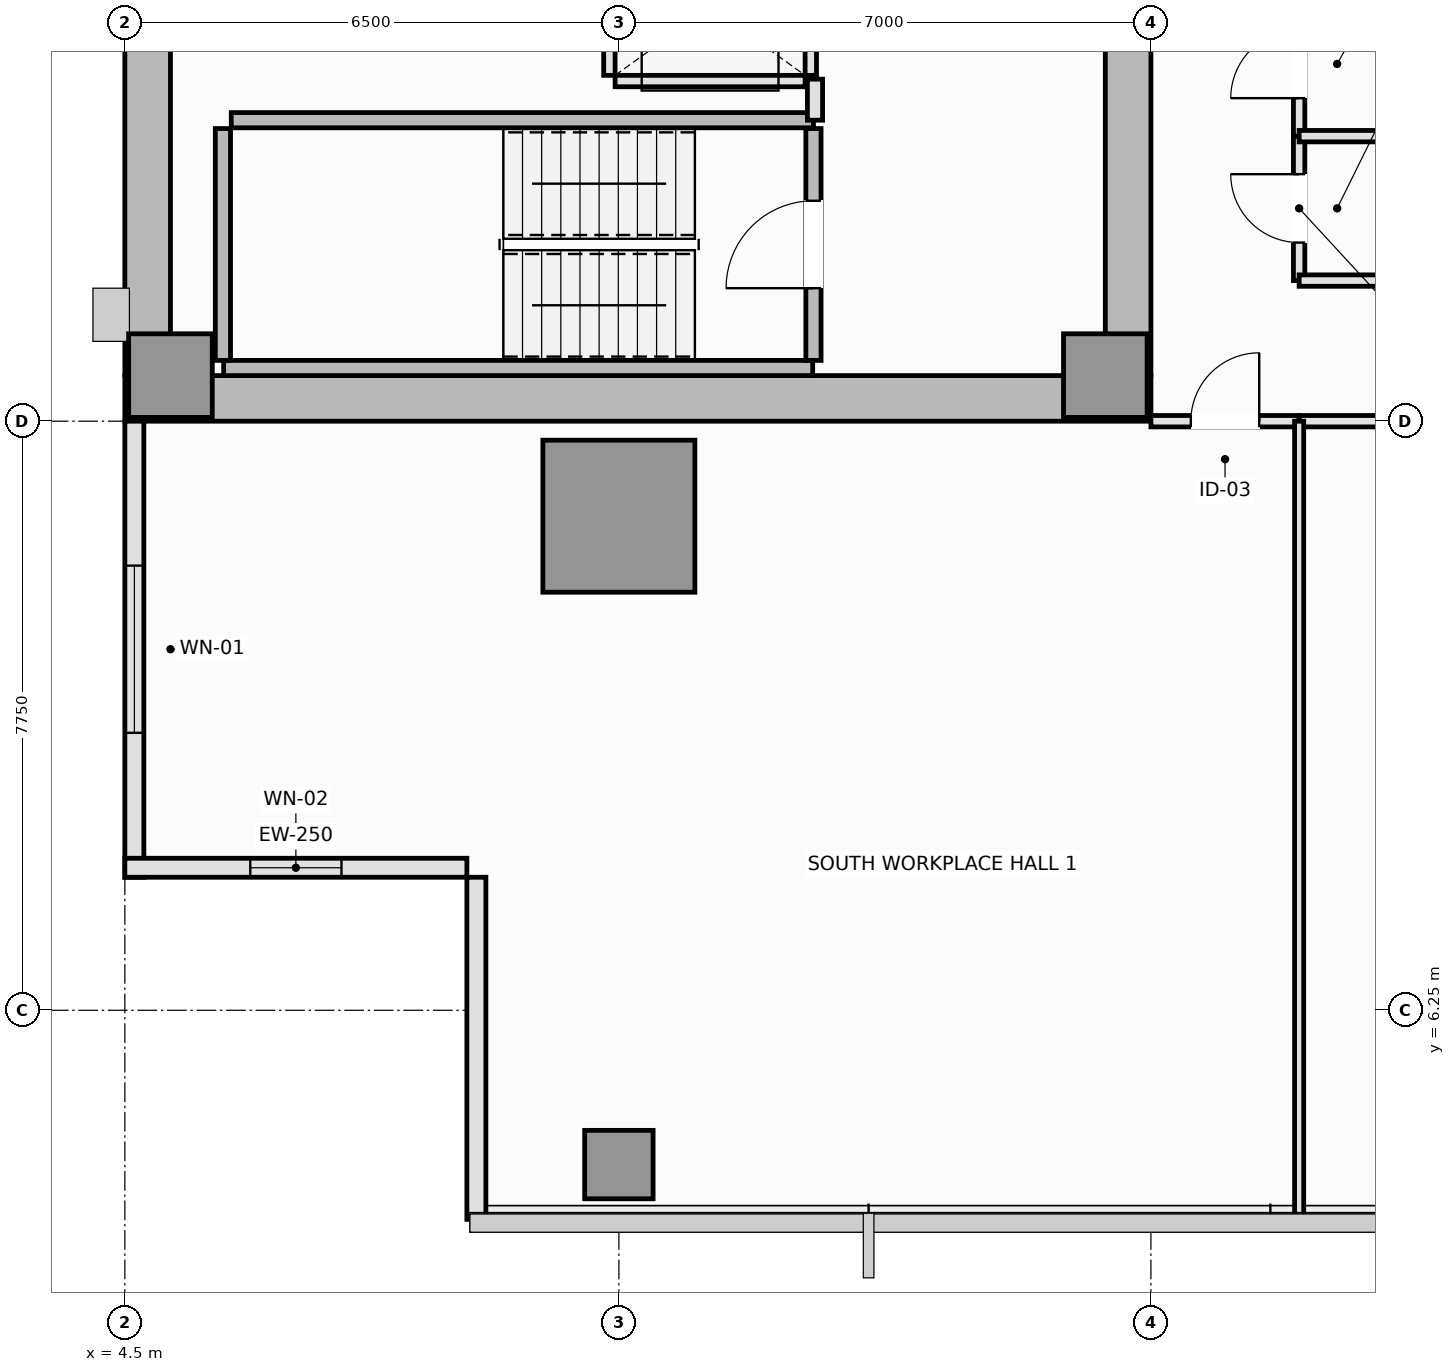
"""IFC4 building model, lengths in metres.
Left out: names, types, materials, properties, quantities, classifications, styles, units other than length and angle.
Written with IfcOpenShell. Run it as: python <this file> out.ifc"""

import sys

from ifc_helpers import new_model, si_unit, direction, frame, frame_2d, origin, origin_2d, place, context, subcontext, project, spatial, rectangle, extrude, element, fill, save


model = new_model("IFC4")
c1 = context("Model", 3, precision=1e-05, world=origin(), true_north=direction((0.0, 1.0)))
c2 = subcontext(c1, "Body", "Model", "MODEL_VIEW")
j1 = project(units=[si_unit("LENGTHUNIT", "METRE"), si_unit("PLANEANGLEUNIT", "RADIAN")], contexts=[c1])
p1 = place(None, origin())
s1 = spatial("IfcSite", under=j1, at=p1, CompositionType="ELEMENT")
p2 = place(p1, origin())
s2 = spatial("IfcBuilding", under=s1, at=p2, CompositionType="ELEMENT")
p3 = place(p2, frame((0.0, 0.0, 127.1)))
s3 = spatial("IfcBuildingStorey", under=s2, at=p3, CompositionType="ELEMENT", Elevation=127.1)
p4 = place(p3, frame((4.5, 14.3, 0.0), z_axis=(0.0, 0.0, 1.0), x_axis=(1.0, 0.0, 0.0)))
e1 = element("IfcWall", 1, at=p4, inside=s3, PredefinedType="SHEAR", context=c2, shape_type="SweptSolid", body=[
    extrude(rectangle(XDim=13.5, YDim=0.6, at=frame_2d((6.75, 0.0))), origin(), (0.0, 0.0, 1.0), 3.55),
])
p5 = place(p3, frame((4.8, 14.6, 0.0), z_axis=(0.0, 0.0, 1.0), x_axis=(0.0, 1.0, 0.0)))
e2 = element("IfcWall", 2, at=p5, inside=s3, PredefinedType="SHEAR", context=c2, shape_type="SweptSolid", body=[
    extrude(rectangle(XDim=21.3, YDim=0.6, at=frame_2d((10.65, 0.0))), origin(), (0.0, 0.0, 1.0), 3.55),
])
p6 = place(p3, frame((17.7, 14.6, 0.0), z_axis=(0.0, 0.0, 1.0), x_axis=(0.0, 1.0, 0.0)))
e3 = element("IfcWall", 3, at=p6, inside=s3, PredefinedType="SHEAR", context=c2, shape_type="SweptSolid", body=[
    extrude(rectangle(XDim=8.85, YDim=0.6, at=frame_2d((4.425, 0.0))), origin(), (0.0, 0.0, 1.0), 3.55),
])
p7 = place(p6, frame((4.3, 0.0, 0.0)))
e4 = element("IfcOpeningElement", 4, at=p7, cuts=e3, PredefinedType="OPENING", context=c2, shape_type="SweptSolid", body=[
    extrude(rectangle(XDim=1.1, YDim=2.15, at=frame_2d((0.55, 1.075))), frame((0.0, 0.31, 0.0), z_axis=(0.0, -1.0, 0.0), x_axis=(1.0, 0.0, 0.0)), (0.0, 0.0, 1.0), 0.62),
])
for number, where, z_axis, x_axis in (
    (5, (5.1, 14.6, 0.0), (0.0, 0.0, 1.0), (1.0, 0.0, 0.0)),
    (6, (17.4, 14.6, 0.0), (0.0, 0.0, 1.0), (1.0, 0.0, 0.0)),
):
    element("IfcColumn", number, at=place(p3, frame(where, z_axis=z_axis, x_axis=x_axis)), inside=s3, PredefinedType="PILASTER", context=c2, shape_type="SweptSolid", body=[
        extrude(rectangle(XDim=1.1, YDim=1.1, at=origin_2d()), origin(), (0.0, 0.0, 1.0), 3.55),
    ])
p8 = place(p3, frame((11.0, 12.75, 0.0), z_axis=(0.0, 0.0, 1.0), x_axis=(1.0, 0.0, 0.0)))
e7 = element("IfcColumn", 7, at=p8, inside=s3, PredefinedType="COLUMN", context=c2, shape_type="SweptSolid", body=[
    extrude(rectangle(XDim=2.0, YDim=2.0, at=origin_2d()), origin(), (0.0, 0.0, 1.0), 3.55),
])
p9 = place(p3, frame((11.0, 4.22, 0.0), z_axis=(0.0, 0.0, 1.0), x_axis=(1.0, 0.0, 0.0)))
e8 = element("IfcColumn", 8, at=p9, inside=s3, PredefinedType="COLUMN", context=c2, shape_type="SweptSolid", body=[
    extrude(rectangle(XDim=0.9, YDim=0.9, at=origin_2d()), origin(), (0.0, 0.0, 1.0), 3.55),
])
p10 = place(p3, frame((4.625, 14.0, 0.0), z_axis=(0.0, 0.0, 1.0), x_axis=(0.0, -1.0, 0.0)))
e9 = element("IfcWall", 9, at=p10, inside=s3, PredefinedType="SOLIDWALL", context=c2, shape_type="SweptSolid", body=[
    extrude(rectangle(XDim=6.0, YDim=0.25, at=frame_2d((3.0, 0.0))), origin(), (0.0, 0.0, 1.0), 3.37),
])
p11 = place(p10, frame((1.9, 0.0, 0.9)))
e10 = element("IfcOpeningElement", 10, at=p11, cuts=e9, PredefinedType="OPENING", context=c2, shape_type="SweptSolid", body=[
    extrude(rectangle(XDim=2.2, YDim=1.8, at=frame_2d((1.1, 0.9))), frame((0.0, 0.135, 0.0), z_axis=(0.0, -1.0, 0.0), x_axis=(1.0, 0.0, 0.0)), (0.0, 0.0, 1.0), 0.27),
])
p12 = place(p3, frame((4.5, 8.125, 0.0), z_axis=(0.0, 0.0, 1.0), x_axis=(1.0, 0.0, 0.0)))
e11 = element("IfcWall", 11, at=p12, inside=s3, PredefinedType="SOLIDWALL", context=c2, shape_type="SweptSolid", body=[
    extrude(rectangle(XDim=4.5, YDim=0.25, at=frame_2d((2.25, 0.0))), origin(), (0.0, 0.0, 1.0), 3.37),
])
p13 = place(p12, frame((1.65, 0.0, 0.9)))
e12 = element("IfcOpeningElement", 12, at=p13, cuts=e11, PredefinedType="OPENING", context=c2, shape_type="SweptSolid", body=[
    extrude(rectangle(XDim=1.2, YDim=1.8, at=frame_2d((0.6, 0.9))), frame((0.0, 0.135, 0.0), z_axis=(0.0, -1.0, 0.0), x_axis=(1.0, 0.0, 0.0)), (0.0, 0.0, 1.0), 0.27),
])
p14 = place(p3, frame((9.125, 8.0, 0.0), z_axis=(0.0, 0.0, 1.0), x_axis=(0.0, -1.0, 0.0)))
e13 = element("IfcWall", 13, at=p14, inside=s3, PredefinedType="SOLIDWALL", context=c2, shape_type="SweptSolid", body=[
    extrude(rectangle(XDim=4.5, YDim=0.25, at=frame_2d((2.25, 0.0))), origin(), (0.0, 0.0, 1.0), 3.37),
])
p15 = place(p3, frame((5.8, 14.7, 0.0), z_axis=(0.0, 0.0, 1.0), x_axis=(1.0, 0.0, 0.0)))
e14 = element("IfcWall", 14, at=p15, inside=s3, PredefinedType="SOLIDWALL", context=c2, shape_type="SweptSolid", body=[
    extrude(rectangle(XDim=7.75, YDim=0.2, at=frame_2d((3.875, 0.0))), origin(), (0.0, 0.0, 1.0), 3.55),
])
p16 = place(p3, frame((5.79, 14.8, 0.0), z_axis=(0.0, 0.0, 1.0), x_axis=(0.0, 1.0, 0.0)))
e15 = element("IfcWall", 15, at=p16, inside=s3, PredefinedType="SOLIDWALL", context=c2, shape_type="SweptSolid", body=[
    extrude(rectangle(XDim=3.05, YDim=0.2, at=frame_2d((1.525, 0.0))), origin(), (0.0, 0.0, 1.0), 3.55),
])
p17 = place(p3, frame((5.9, 17.96, 0.0), z_axis=(0.0, 0.0, 1.0), x_axis=(1.0, 0.0, 0.0)))
e16 = element("IfcWall", 16, at=p17, inside=s3, PredefinedType="SOLIDWALL", context=c2, shape_type="SweptSolid", body=[
    extrude(rectangle(XDim=7.66, YDim=0.2, at=frame_2d((3.83, 0.0))), origin(), (0.0, 0.0, 1.0), 3.55),
])
p18 = place(p3, frame((13.56, 14.8, 0.0), z_axis=(0.0, 0.0, 1.0), x_axis=(0.0, 1.0, 0.0)))
e17 = element("IfcWall", 17, at=p18, inside=s3, PredefinedType="SOLIDWALL", context=c2, shape_type="SweptSolid", body=[
    extrude(rectangle(XDim=3.05, YDim=0.2, at=frame_2d((1.525, 0.0))), origin(), (0.0, 0.0, 1.0), 3.55),
])
p19 = place(p18, frame((0.95, 0.0, 0.0)))
e18 = element("IfcOpeningElement", 18, at=p19, cuts=e17, PredefinedType="OPENING", context=c2, shape_type="SweptSolid", body=[
    extrude(rectangle(XDim=1.15, YDim=2.15, at=frame_2d((0.575, 1.075))), frame((0.0, 0.11, 0.0), z_axis=(0.0, -1.0, 0.0), x_axis=(1.0, 0.0, 0.0)), (0.0, 0.0, 1.0), 0.22),
])
p20 = place(p3, frame((10.95, 18.475, 0.0), z_axis=(0.0, 0.0, 1.0), x_axis=(1.0, 0.0, 0.0)))
e19 = element("IfcWall", 19, at=p20, inside=s3, PredefinedType="PARTITIONING", context=c2, shape_type="SweptSolid", body=[
    extrude(rectangle(XDim=2.5, YDim=0.15, at=frame_2d((1.25, 0.0))), origin(), (0.0, 0.0, 1.0), 3.37),
])
p21 = place(p3, frame((10.875, 18.55, 0.0), z_axis=(0.0, 0.0, 1.0), x_axis=(0.0, 1.0, 0.0)))
e20 = element("IfcWall", 20, at=p21, inside=s3, PredefinedType="PARTITIONING", context=c2, shape_type="SweptSolid", body=[
    extrude(rectangle(XDim=1.8, YDim=0.15, at=frame_2d((0.9, 0.0))), origin(), (0.0, 0.0, 1.0), 3.37),
])
p22 = place(p3, frame((13.525, 18.55, 0.0), z_axis=(0.0, 0.0, 1.0), x_axis=(0.0, 1.0, 0.0)))
e21 = element("IfcWall", 21, at=p22, inside=s3, PredefinedType="PARTITIONING", context=c2, shape_type="SweptSolid", body=[
    extrude(rectangle(XDim=1.8, YDim=0.15, at=frame_2d((0.9, 0.0))), origin(), (0.0, 0.0, 1.0), 3.37),
])
p23 = place(p22, frame((0.35, 0.0, 0.0)))
e22 = element("IfcOpeningElement", 22, at=p23, cuts=e21, PredefinedType="OPENING", context=c2, shape_type="SweptSolid", body=[
    extrude(rectangle(XDim=1.1, YDim=2.2, at=frame_2d((0.55, 1.1))), frame((0.0, 0.085, 0.0), z_axis=(0.0, -1.0, 0.0), x_axis=(1.0, 0.0, 0.0)), (0.0, 0.0, 1.0), 0.17),
])
p24 = place(p3, frame((13.58, 17.96, 0.0), z_axis=(0.0, 0.0, 1.0), x_axis=(0.0, 1.0, 0.0)))
e23 = element("IfcWall", 23, at=p24, inside=s3, PredefinedType="PARTITIONING", context=c2, shape_type="SweptSolid", body=[
    extrude(rectangle(XDim=0.54, YDim=0.2, at=frame_2d((0.27, 0.0))), origin(), (0.0, 0.0, 1.0), 3.37),
])
p25 = place(p3, frame((19.95, 15.85, 0.0), z_axis=(0.0, 0.0, 1.0), x_axis=(0.0, 1.0, 0.0)))
e24 = element("IfcWall", 24, at=p25, inside=s3, PredefinedType="PLUMBINGWALL", context=c2, shape_type="SweptSolid", body=[
    extrude(rectangle(XDim=1.9, YDim=0.15, at=frame_2d((0.95, 0.0))), origin(), (0.0, 0.0, 1.0), 3.37),
])
p26 = place(p25, frame((0.5, 0.0, 0.0)))
e25 = element("IfcOpeningElement", 25, at=p26, cuts=e24, PredefinedType="OPENING", context=c2, shape_type="SweptSolid", body=[
    extrude(rectangle(XDim=0.9, YDim=2.1, at=frame_2d((0.45, 1.05))), frame((0.0, 0.085, 0.0), z_axis=(0.0, -1.0, 0.0), x_axis=(1.0, 0.0, 0.0)), (0.0, 0.0, 1.0), 0.17),
])
p27 = place(p3, frame((19.95, 17.75, 0.0), z_axis=(0.0, 0.0, 1.0), x_axis=(0.0, 1.0, 0.0)))
e26 = element("IfcWall", 26, at=p27, inside=s3, PredefinedType="PLUMBINGWALL", context=c2, shape_type="SweptSolid", body=[
    extrude(rectangle(XDim=1.9, YDim=0.15, at=frame_2d((0.95, 0.0))), origin(), (0.0, 0.0, 1.0), 3.37),
])
p28 = place(p27, frame((0.5, 0.0, 0.0)))
e27 = element("IfcOpeningElement", 27, at=p28, cuts=e26, PredefinedType="OPENING", context=c2, shape_type="SweptSolid", body=[
    extrude(rectangle(XDim=0.9, YDim=2.1, at=frame_2d((0.45, 1.05))), frame((0.0, 0.085, 0.0), z_axis=(0.0, -1.0, 0.0), x_axis=(1.0, 0.0, 0.0)), (0.0, 0.0, 1.0), 0.17),
])
p29 = place(p3, frame((18.0, 14.0, 0.0), z_axis=(0.0, 0.0, 1.0), x_axis=(1.0, 0.0, 0.0)))
e28 = element("IfcWall", 28, at=p29, inside=s3, PredefinedType="PARTITIONING", context=c2, shape_type="SweptSolid", body=[
    extrude(rectangle(XDim=1.95, YDim=0.15, at=frame_2d((0.975, 0.0))), origin(), (0.0, 0.0, 1.0), 3.37),
])
p30 = place(p29, frame((0.525, 0.0, 0.0)))
e29 = element("IfcOpeningElement", 29, at=p30, cuts=e28, PredefinedType="OPENING", context=c2, shape_type="SweptSolid", body=[
    extrude(rectangle(XDim=0.9, YDim=2.1, at=frame_2d((0.45, 1.05))), frame((0.0, 0.085, 0.0), z_axis=(0.0, -1.0, 0.0), x_axis=(1.0, 0.0, 0.0)), (0.0, 0.0, 1.0), 0.17),
])
p31 = place(p3, frame((19.95, 15.85, 0.0), z_axis=(0.0, 0.0, 1.0), x_axis=(1.0, 0.0, 0.0)))
e30 = element("IfcWall", 30, at=p31, inside=s3, PredefinedType="PLUMBINGWALL", context=c2, shape_type="SweptSolid", body=[
    extrude(rectangle(XDim=3.65, YDim=0.15, at=frame_2d((1.825, 0.0))), origin(), (0.0, 0.0, 1.0), 3.37),
])
p32 = place(p3, frame((19.95, 14.0, 0.0), z_axis=(0.0, 0.0, 1.0), x_axis=(1.0, 0.0, 0.0)))
e31 = element("IfcWall", 31, at=p32, inside=s3, PredefinedType="PARTITIONING", context=c2, shape_type="SweptSolid", body=[
    extrude(rectangle(XDim=7.55, YDim=0.15, at=frame_2d((3.775, 0.0))), origin(), (0.0, 0.0, 1.0), 3.37),
])
p33 = place(p32, frame((3.275, 0.0, 0.0)))
e32 = element("IfcOpeningElement", 32, at=p33, cuts=e31, PredefinedType="OPENING", context=c2, shape_type="SweptSolid", body=[
    extrude(rectangle(XDim=1.0, YDim=2.15, at=frame_2d((0.5, 1.075))), frame((0.0, 0.085, 0.0), z_axis=(0.0, -1.0, 0.0), x_axis=(1.0, 0.0, 0.0)), (0.0, 0.0, 1.0), 0.17),
])
p34 = place(p3, frame((19.95, 17.75, 0.0), z_axis=(0.0, 0.0, 1.0), x_axis=(1.0, 0.0, 0.0)))
e33 = element("IfcWall", 33, at=p34, inside=s3, PredefinedType="PLUMBINGWALL", context=c2, shape_type="SweptSolid", body=[
    extrude(rectangle(XDim=3.65, YDim=0.15, at=frame_2d((1.825, 0.0))), origin(), (0.0, 0.0, 1.0), 3.37),
])
p35 = place(p3, frame((19.95, 3.51, 0.0), z_axis=(0.0, 0.0, 1.0), x_axis=(0.0, 1.0, 0.0)))
e34 = element("IfcWall", 34, at=p35, inside=s3, PredefinedType="PARTITIONING", context=c2, shape_type="SweptSolid", body=[
    extrude(rectangle(XDim=10.49, YDim=0.12, at=frame_2d((5.245, 0.0))), origin(), (0.0, 0.0, 1.0), 3.37),
])
p36 = place(p11, origin())
e35 = element("IfcWindow", 35, at=p36, inside=s3, PartitioningType="SINGLE_PANEL", PredefinedType="WINDOW", context=c2, shape_type="SweptSolid", body=[
    extrude(rectangle(XDim=2.2, YDim=1.8, at=frame_2d((1.1, 0.9))), frame((0.0, 0.03, 0.0), z_axis=(0.0, -1.0, 0.0), x_axis=(1.0, 0.0, 0.0)), (0.0, 0.0, 1.0), 0.06),
])
fill(e10, e35)
p37 = place(p13, origin())
e36 = element("IfcWindow", 36, at=p37, inside=s3, PartitioningType="SINGLE_PANEL", PredefinedType="WINDOW", context=c2, shape_type="SweptSolid", body=[
    extrude(rectangle(XDim=1.2, YDim=1.8, at=frame_2d((0.6, 0.9))), frame((0.0, 0.03, 0.0), z_axis=(0.0, -1.0, 0.0), x_axis=(1.0, 0.0, 0.0)), (0.0, 0.0, 1.0), 0.06),
])
fill(e12, e36)
p38 = place(p19, origin())
e37 = element("IfcDoor", 37, at=p38, inside=s3, OperationType="SINGLE_SWING_LEFT", PredefinedType="DOOR", context=c2, shape_type="SweptSolid", body=[
    extrude(rectangle(XDim=1.15, YDim=2.15, at=frame_2d((0.575, 1.075))), frame((0.0, 0.025, 0.0), z_axis=(0.0, -1.0, 0.0), x_axis=(1.0, 0.0, 0.0)), (0.0, 0.0, 1.0), 0.05),
])
fill(e18, e37)
p39 = place(p26, origin())
e38 = element("IfcDoor", 38, at=p39, inside=s3, OperationType="SINGLE_SWING_RIGHT", PredefinedType="DOOR", context=c2, shape_type="SweptSolid", body=[
    extrude(rectangle(XDim=0.9, YDim=2.1, at=frame_2d((0.45, 1.05))), frame((0.0, 0.025, 0.0), z_axis=(0.0, -1.0, 0.0), x_axis=(1.0, 0.0, 0.0)), (0.0, 0.0, 1.0), 0.05),
])
fill(e25, e38)
p40 = place(p28, origin())
e39 = element("IfcDoor", 39, at=p40, inside=s3, OperationType="SINGLE_SWING_LEFT", PredefinedType="DOOR", context=c2, shape_type="SweptSolid", body=[
    extrude(rectangle(XDim=0.9, YDim=2.1, at=frame_2d((0.45, 1.05))), frame((0.0, 0.025, 0.0), z_axis=(0.0, -1.0, 0.0), x_axis=(1.0, 0.0, 0.0)), (0.0, 0.0, 1.0), 0.05),
])
fill(e27, e39)
p41 = place(p30, origin())
e40 = element("IfcDoor", 40, at=p41, inside=s3, OperationType="SINGLE_SWING_RIGHT", PredefinedType="DOOR", context=c2, shape_type="SweptSolid", body=[
    extrude(rectangle(XDim=0.9, YDim=2.1, at=frame_2d((0.45, 1.05))), frame((0.0, 0.025, 0.0), z_axis=(0.0, -1.0, 0.0), x_axis=(1.0, 0.0, 0.0)), (0.0, 0.0, 1.0), 0.05),
])
fill(e29, e40)
save(model, sys.argv[1])
